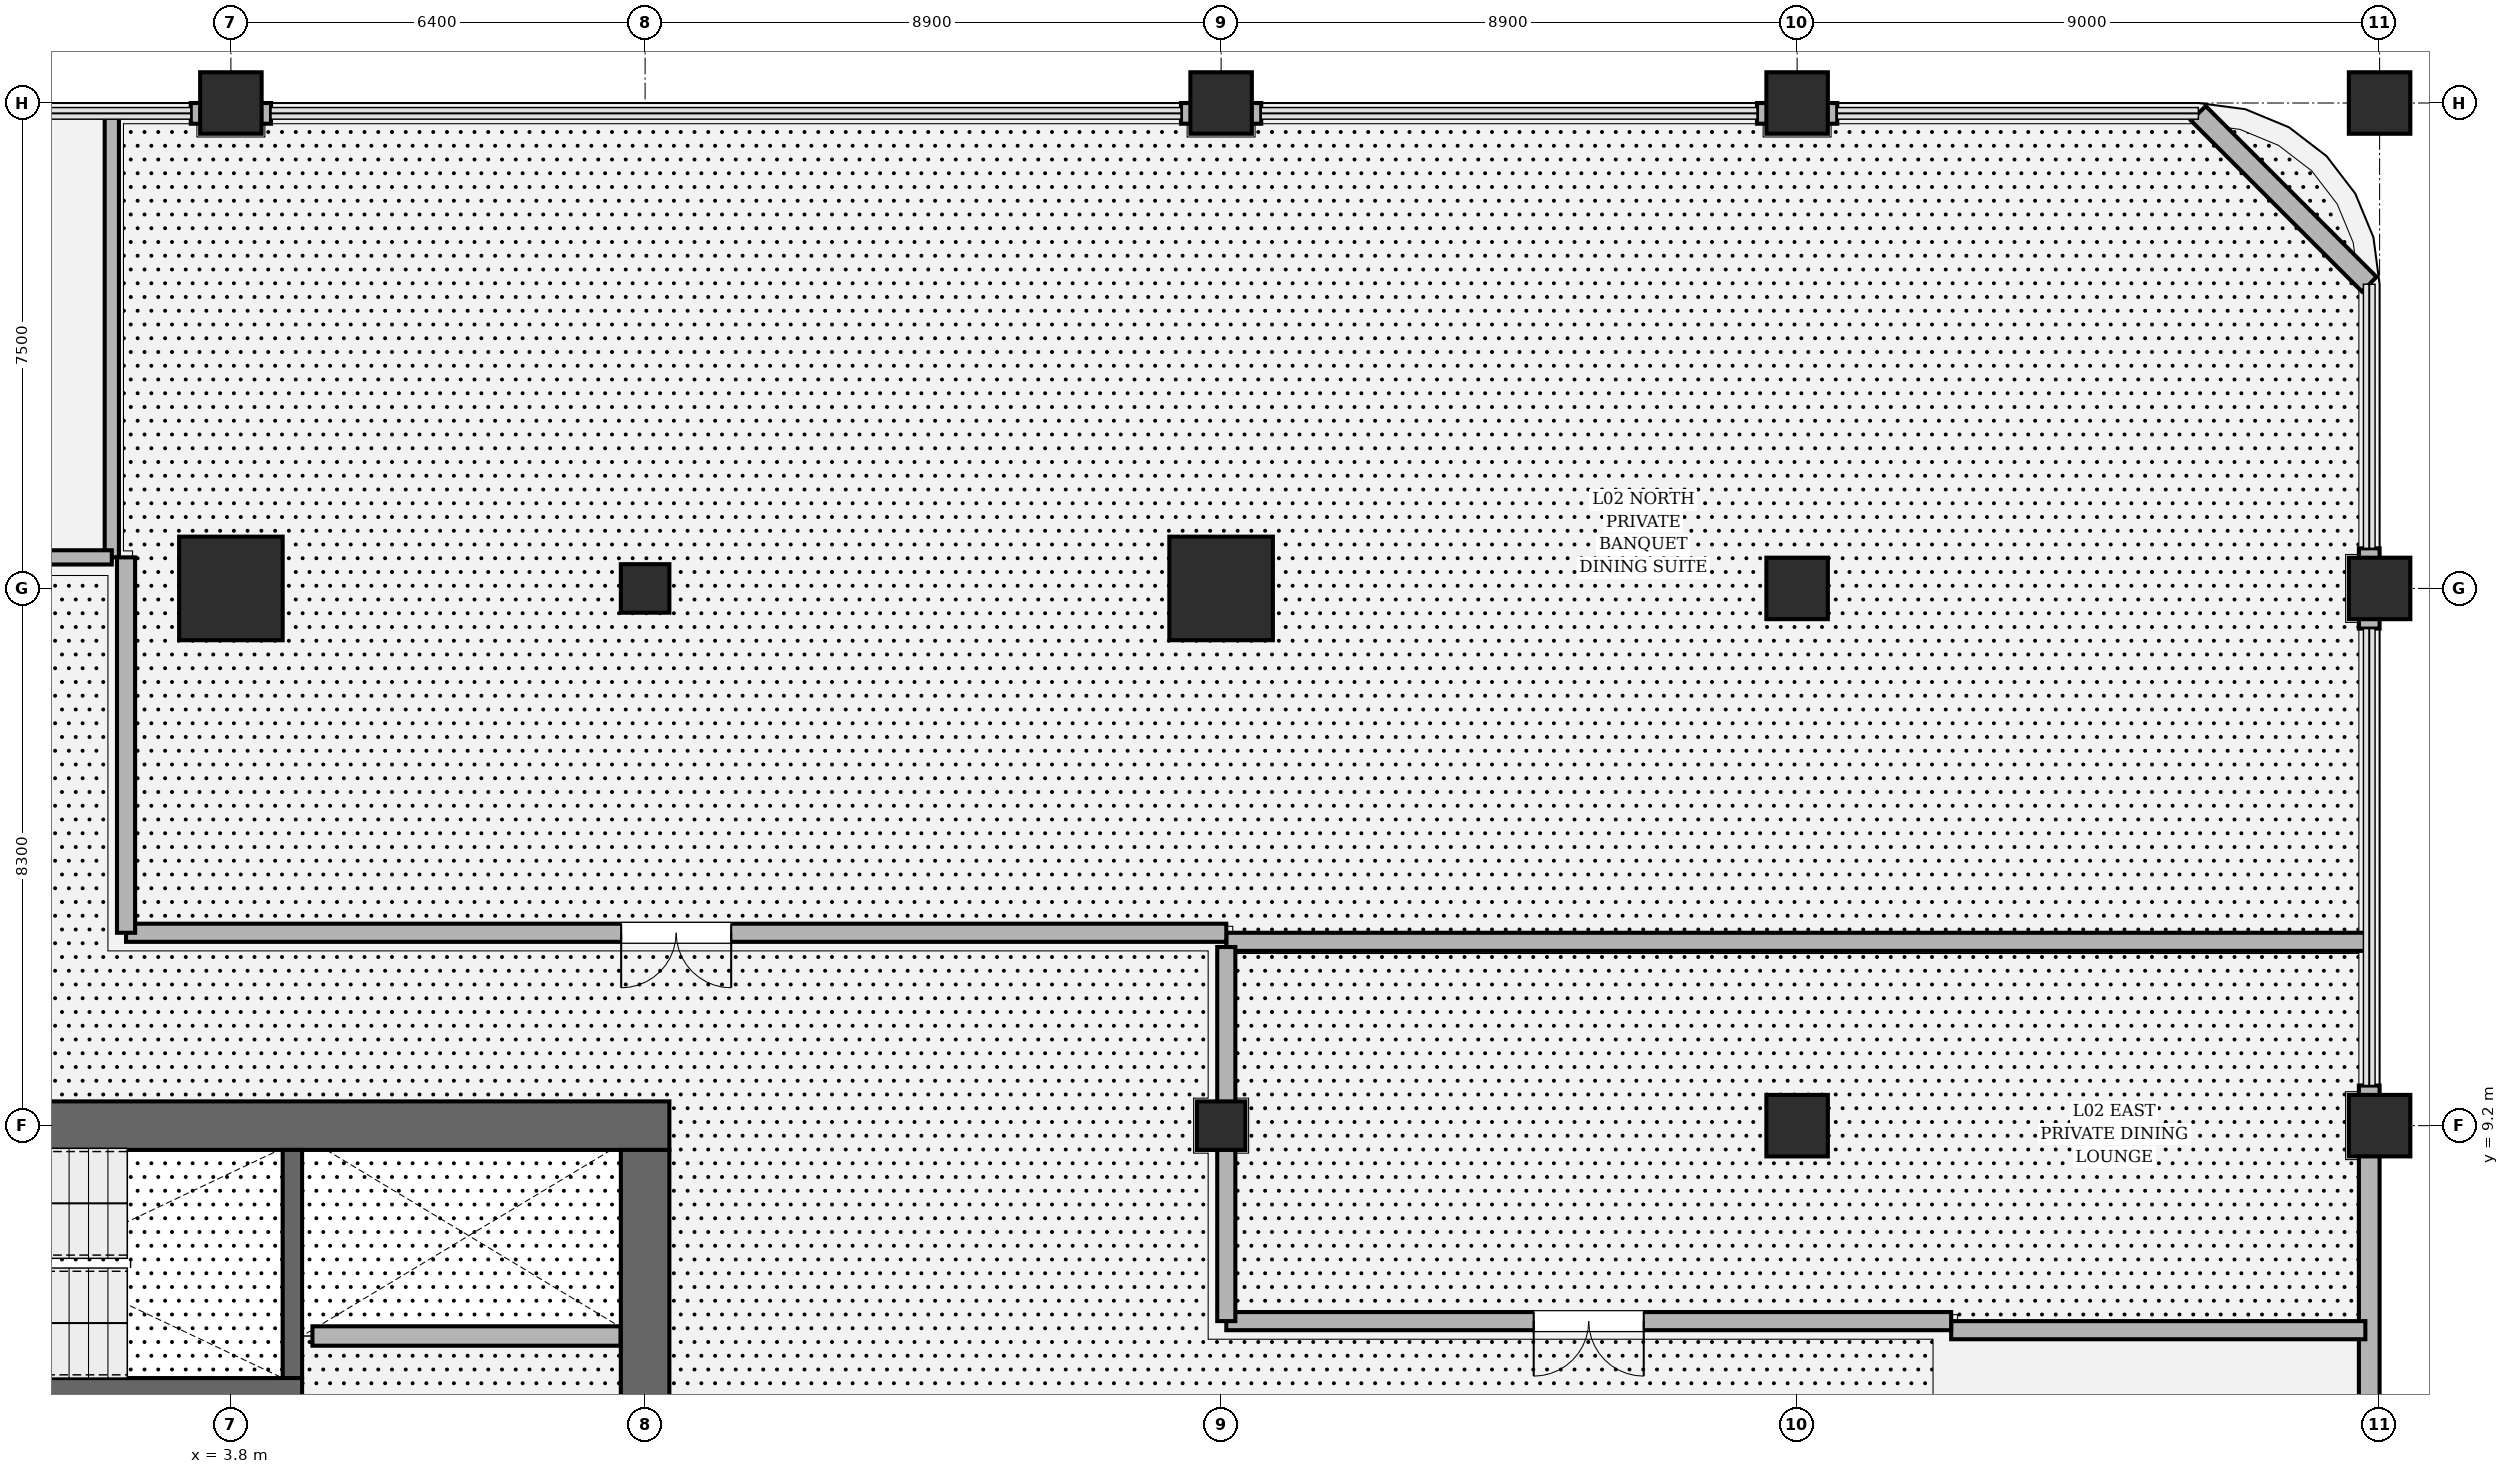
"""IFC4 building model, lengths in metres.
Left out: names, types, materials, properties, quantities, classifications, styles, units other than length and angle.
Written with IfcOpenShell. Run it as: python <this file> out.ifc"""

import sys

from ifc_helpers import new_model, si_unit, direction, frame, frame_2d, origin, origin_2d, place, context, subcontext, project, spatial, rectangle, hollow_rectangle, circle, extrude, element, fill, save


model = new_model("IFC4")
c1 = context("Model", 3, precision=1e-05, world=origin(), true_north=direction((0.0, 1.0)))
c2 = subcontext(c1, "Body", "Model", "MODEL_VIEW")
j1 = project(units=[si_unit("LENGTHUNIT", "METRE"), si_unit("PLANEANGLEUNIT", "RADIAN")], contexts=[c1])
p1 = place(None, origin())
s1 = spatial("IfcSite", under=j1, at=p1, CompositionType="ELEMENT")
p2 = place(p1, origin())
s2 = spatial("IfcBuilding", under=s1, at=p2, CompositionType="ELEMENT")
p3 = place(p2, frame((0.0, 0.0, 11.4)))
s3 = spatial("IfcBuildingStorey", under=s2, at=p3, CompositionType="ELEMENT", Elevation=11.4)
p4 = place(p3, frame((-10.575, 9.2, 0.0), z_axis=(0.0, 0.0, 1.0), x_axis=(1.0, 0.0, 0.0)))
e1 = element("IfcWall", 1, at=p4, inside=s3, PredefinedType="SHEAR", context=c2, shape_type="SweptSolid", body=[
    extrude(rectangle(XDim=21.15, YDim=0.75, at=frame_2d((10.575, 0.0))), origin(), (0.0, 0.0, 1.0), 5.4),
])
p5 = place(p3, frame((10.2, 8.825, 0.0), z_axis=(0.0, 0.0, 1.0), x_axis=(0.0, -1.0, 0.0)))
e2 = element("IfcWall", 2, at=p5, inside=s3, PredefinedType="SHEAR", context=c2, shape_type="SweptSolid", body=[
    extrude(rectangle(XDim=17.65, YDim=0.75, at=frame_2d((8.825, 0.0))), origin(), (0.0, 0.0, 1.0), 5.4),
])
p6 = place(p5, frame((3.855, 0.0, 0.0)))
e3 = element("IfcOpeningElement", 3, at=p6, cuts=e2, PredefinedType="OPENING", context=c2, shape_type="SweptSolid", body=[
    extrude(rectangle(XDim=1.18, YDim=2.2, at=frame_2d((0.59, 1.1))), frame((0.0, 0.385, 0.0), z_axis=(0.0, -1.0, 0.0), x_axis=(1.0, 0.0, 0.0)), (0.0, 0.0, 1.0), 0.77),
])
p7 = place(p3, frame((4.75, 8.825, 0.0), z_axis=(0.0, 0.0, 1.0), x_axis=(0.0, -1.0, 0.0)))
e4 = element("IfcWall", 4, at=p7, inside=s3, PredefinedType="SOLIDWALL", context=c2, shape_type="SweptSolid", body=[
    extrude(rectangle(XDim=3.525, YDim=0.3, at=frame_2d((1.762, 0.0))), origin(), (0.0, 0.0, 1.0), 5.4),
])
p8 = place(p3, frame((-4.9, 5.15, 0.0), z_axis=(0.0, 0.0, 1.0), x_axis=(1.0, 0.0, 0.0)))
e5 = element("IfcWall", 5, at=p8, inside=s3, PredefinedType="SOLIDWALL", context=c2, shape_type="SweptSolid", body=[
    extrude(rectangle(XDim=9.8, YDim=0.3, at=frame_2d((4.9, 0.0))), origin(), (0.0, 0.0, 1.0), 5.4),
])
p9 = place(p8, frame((0.56, 0.0, 0.0)))
e6 = element("IfcOpeningElement", 6, at=p9, cuts=e5, PredefinedType="OPENING", context=c2, shape_type="SweptSolid", body=[
    extrude(rectangle(XDim=1.18, YDim=2.2, at=frame_2d((0.59, 1.1))), frame((0.0, 0.16, 0.0), z_axis=(0.0, -1.0, 0.0), x_axis=(1.0, 0.0, 0.0)), (0.0, 0.0, 1.0), 0.32),
])
for number, where, z_axis, x_axis in (
    (7, (19.1, 17.5, 0.0), (0.0, 0.0, 1.0), (1.0, 0.0, 0.0)),
    (8, (3.8, 17.5, 0.0), (0.0, 0.0, 1.0), (1.0, 0.0, 0.0)),
):
    element("IfcColumn", number, at=place(p3, frame(where, z_axis=z_axis, x_axis=x_axis)), inside=s3, PredefinedType="COLUMN", context=c2, shape_type="SweptSolid", body=[
        extrude(hollow_rectangle(XDim=1.6, YDim=1.6, WallThickness=0.05, at=origin_2d()), origin(), (0.0, 0.0, 1.0), 5.4),
    ])
for number, where, z_axis, x_axis in (
    (9, (37.0, 9.2, 0.0), (0.0, 0.0, 1.0), (1.0, 0.0, 0.0)),
    (10, (28.0, 17.5, 0.0), (0.0, 0.0, 1.0), (1.0, 0.0, 0.0)),
    (11, (37.0, 17.5, 0.0), (0.0, 0.0, 1.0), (1.0, 0.0, 0.0)),
    (12, (3.8, 25.0, 0.0), (0.0, 0.0, 1.0), (1.0, 0.0, 0.0)),
    (13, (19.1, 25.0, 0.0), (0.0, 0.0, 1.0), (1.0, 0.0, 0.0)),
    (14, (28.0, 25.0, 0.0), (0.0, 0.0, 1.0), (1.0, 0.0, 0.0)),
    (15, (37.0, 25.0, 0.0), (0.0, 0.0, 1.0), (1.0, 0.0, 0.0)),
    (16, (28.0, 9.2, 0.0), (0.0, 0.0, 1.0), (1.0, 0.0, 0.0)),
):
    element("IfcColumn", number, at=place(p3, frame(where, z_axis=z_axis, x_axis=x_axis)), inside=s3, PredefinedType="COLUMN", context=c2, shape_type="SweptSolid", body=[
        extrude(rectangle(XDim=0.95, YDim=0.95, at=origin_2d()), origin(), (0.0, 0.0, 1.0), 5.4),
    ])
for number, where, z_axis, x_axis in (
    (17, (10.2, 17.5, 0.0), (0.0, 0.0, 1.0), (1.0, 0.0, 0.0)),
    (18, (19.1, 9.2, 0.0), (0.0, 0.0, 1.0), (1.0, 0.0, 0.0)),
):
    element("IfcColumn", number, at=place(p3, frame(where, z_axis=z_axis, x_axis=x_axis)), inside=s3, PredefinedType="PILASTER", context=c2, shape_type="SweptSolid", body=[
        extrude(circle(Radius=0.375, at=origin_2d()), origin(), (0.0, 0.0, 1.0), 5.4),
    ])
for number, where, z_axis, x_axis in (
    (19, (4.42, 24.84, 0.0), (0.0, 0.0, 1.0), (-1.0, 0.0, 0.0)),
    (20, (19.72, 24.84, 0.0), (0.0, 0.0, 1.0), (-1.0, 0.0, 0.0)),
):
    element("IfcWall", number, at=place(p3, frame(where, z_axis=z_axis, x_axis=x_axis)), inside=s3, PredefinedType="SOLIDWALL", context=c2, shape_type="SweptSolid", body=[
        extrude(rectangle(XDim=1.24, YDim=0.32, at=frame_2d((0.62, 0.0))), origin(), (0.0, 0.0, 1.0), 4.414),
    ])
p10 = place(p3, frame((28.62, 24.84, 0.0), z_axis=(0.0, 0.0, 1.0), x_axis=(-1.0, 0.0, 0.0)))
e21 = element("IfcWall", 21, at=p10, inside=s3, PredefinedType="SOLIDWALL", context=c2, shape_type="SweptSolid", body=[
    extrude(rectangle(XDim=1.24, YDim=0.32, at=frame_2d((0.62, 0.0))), origin(), (0.0, 0.0, 1.0), 4.414),
])
p11 = place(p3, frame((36.84, 9.82, 0.0), z_axis=(0.0, 0.0, 1.0), x_axis=(0.0, -1.0, 0.0)))
e22 = element("IfcWall", 22, at=p11, inside=s3, PredefinedType="SOLIDWALL", context=c2, shape_type="SweptSolid", body=[
    extrude(rectangle(XDim=19.64, YDim=0.32, at=frame_2d((9.82, 0.0))), origin(), (0.0, 0.0, 1.0), 4.414),
])
p12 = place(p3, frame((36.84, 18.12, 0.0), z_axis=(0.0, 0.0, 1.0), x_axis=(0.0, -1.0, 0.0)))
e23 = element("IfcWall", 23, at=p12, inside=s3, PredefinedType="SOLIDWALL", context=c2, shape_type="SweptSolid", body=[
    extrude(rectangle(XDim=1.24, YDim=0.32, at=frame_2d((0.62, 0.0))), origin(), (0.0, 0.0, 1.0), 4.414),
])
p13 = place(p3, frame((34.2, 24.84, 0.0), z_axis=(0.0, 0.0, 1.0), x_axis=(0.707106781187, -0.707106781187, 0.0)))
e24 = element("IfcWall", 24, at=p13, inside=s3, PredefinedType="SOLIDWALL", context=c2, shape_type="SweptSolid", body=[
    extrude(rectangle(XDim=3.734, YDim=0.32, at=frame_2d((1.867, 0.0))), origin(), (0.0, 0.0, 1.0), 4.564),
])
p14 = place(p3, frame((5.06, 5.95, 0.0), z_axis=(0.0, 0.0, 1.0), x_axis=(1.0, 0.0, 0.0)))
e25 = element("IfcWall", 25, at=p14, inside=s3, PredefinedType="SOLIDWALL", context=c2, shape_type="SweptSolid", body=[
    extrude(rectangle(XDim=4.76, YDim=0.3, at=frame_2d((2.38, 0.0))), origin(), (0.0, 0.0, 1.0), 5.12),
])
p15 = place(p3, frame((1.96, 24.78, 0.0), z_axis=(0.0, 0.0, 1.0), x_axis=(0.0, -1.0, 0.0)))
e26 = element("IfcWall", 26, at=p15, inside=s3, PredefinedType="SOLIDWALL", context=c2, shape_type="SweptSolid", body=[
    extrude(rectangle(XDim=6.8, YDim=0.22, at=frame_2d((3.4, 0.0))), origin(), (0.0, 0.0, 1.0), 5.12),
])
p16 = place(p3, frame((1.96, 17.98, 0.0), z_axis=(0.0, 0.0, 1.0), x_axis=(-1.0, 0.0, 0.0)))
e27 = element("IfcWall", 27, at=p16, inside=s3, PredefinedType="SOLIDWALL", context=c2, shape_type="SweptSolid", body=[
    extrude(rectangle(XDim=8.1, YDim=0.22, at=frame_2d((4.05, 0.0))), origin(), (0.0, 0.0, 1.0), 4.414),
])
p17 = place(p16, frame((3.5, 0.0, 0.0)))
e28 = element("IfcOpeningElement", 28, at=p17, cuts=e27, PredefinedType="OPENING", context=c2, shape_type="SweptSolid", body=[
    extrude(rectangle(XDim=1.1, YDim=2.2, at=frame_2d((0.55, 1.1))), frame((0.0, 0.12, 0.0), z_axis=(0.0, -1.0, 0.0), x_axis=(1.0, 0.0, 0.0)), (0.0, 0.0, 1.0), 0.24),
])
p18 = place(p3, frame((36.78, 12.04, 0.0), z_axis=(0.0, 0.0, 1.0), x_axis=(-1.0, 0.0, 0.0)))
e29 = element("IfcWall", 29, at=p18, inside=s3, PredefinedType="SOLIDWALL", context=c2, shape_type="SweptSolid", body=[
    extrude(rectangle(XDim=17.6, YDim=0.28, at=frame_2d((8.8, 0.0))), origin(), (0.0, 0.0, 1.0), 4.414),
])
p19 = place(p3, frame((19.18, 12.18, 0.0), z_axis=(0.0, 0.0, 1.0), x_axis=(-1.0, 0.0, 0.0)))
e30 = element("IfcWall", 30, at=p19, inside=s3, PredefinedType="SOLIDWALL", context=c2, shape_type="SweptSolid", body=[
    extrude(rectangle(XDim=17.0, YDim=0.28, at=frame_2d((8.5, 0.0))), origin(), (0.0, 0.0, 1.0), 4.414),
])
p20 = place(p19, frame((7.65, 0.0, 0.0)))
e31 = element("IfcOpeningElement", 31, at=p20, cuts=e30, PredefinedType="OPENING", context=c2, shape_type="SweptSolid", body=[
    extrude(rectangle(XDim=1.7, YDim=2.3, at=frame_2d((0.85, 1.15))), frame((0.0, 0.15, 0.0), z_axis=(0.0, -1.0, 0.0), x_axis=(1.0, 0.0, 0.0)), (0.0, 0.0, 1.0), 0.3),
])
p21 = place(p3, frame((2.18, 12.18, 0.0), z_axis=(0.0, 0.0, 1.0), x_axis=(0.0, 1.0, 0.0)))
e32 = element("IfcWall", 32, at=p21, inside=s3, PredefinedType="SOLIDWALL", context=c2, shape_type="SweptSolid", body=[
    extrude(rectangle(XDim=5.8, YDim=0.28, at=frame_2d((2.9, 0.0))), origin(), (0.0, 0.0, 1.0), 4.414),
])
p22 = place(p3, frame((36.78, 6.04, 0.0), z_axis=(0.0, 0.0, 1.0), x_axis=(-1.0, 0.0, 0.0)))
e33 = element("IfcWall", 33, at=p22, inside=s3, PredefinedType="SOLIDWALL", context=c2, shape_type="SweptSolid", body=[
    extrude(rectangle(XDim=6.4, YDim=0.28, at=frame_2d((3.2, 0.0))), origin(), (0.0, 0.0, 1.0), 5.12),
])
p23 = place(p3, frame((30.38, 6.18, 0.0), z_axis=(0.0, 0.0, 1.0), x_axis=(-1.0, 0.0, 0.0)))
e34 = element("IfcWall", 34, at=p23, inside=s3, PredefinedType="SOLIDWALL", context=c2, shape_type="SweptSolid", body=[
    extrude(rectangle(XDim=11.2, YDim=0.28, at=frame_2d((5.6, 0.0))), origin(), (0.0, 0.0, 1.0), 4.414),
])
p24 = place(p23, frame((4.75, 0.0, 0.0)))
e35 = element("IfcOpeningElement", 35, at=p24, cuts=e34, PredefinedType="OPENING", context=c2, shape_type="SweptSolid", body=[
    extrude(rectangle(XDim=1.7, YDim=2.3, at=frame_2d((0.85, 1.15))), frame((0.0, 0.15, 0.0), z_axis=(0.0, -1.0, 0.0), x_axis=(1.0, 0.0, 0.0)), (0.0, 0.0, 1.0), 0.3),
])
p25 = place(p3, frame((19.18, 6.18, 0.0), z_axis=(0.0, 0.0, 1.0), x_axis=(0.0, 1.0, 0.0)))
e36 = element("IfcWall", 36, at=p25, inside=s3, PredefinedType="SOLIDWALL", context=c2, shape_type="SweptSolid", body=[
    extrude(rectangle(XDim=5.78, YDim=0.28, at=frame_2d((2.89, 0.0))), origin(), (0.0, 0.0, 1.0), 4.414),
])
p26 = place(p20, origin())
e37 = element("IfcDoor", 37, at=p26, inside=s3, OperationType="DOUBLE_DOOR_SINGLE_SWING", PredefinedType="DOOR", context=c2, shape_type="SweptSolid", body=[
    extrude(rectangle(XDim=1.7, YDim=2.3, at=frame_2d((0.85, 1.15))), frame((0.0, 0.025, 0.0), z_axis=(0.0, -1.0, 0.0), x_axis=(1.0, 0.0, 0.0)), (0.0, 0.0, 1.0), 0.05),
])
fill(e31, e37)
p27 = place(p24, origin())
e38 = element("IfcDoor", 38, at=p27, inside=s3, OperationType="DOUBLE_DOOR_SINGLE_SWING", PredefinedType="DOOR", context=c2, shape_type="SweptSolid", body=[
    extrude(rectangle(XDim=1.7, YDim=2.3, at=frame_2d((0.85, 1.15))), frame((0.0, 0.025, 0.0), z_axis=(0.0, -1.0, 0.0), x_axis=(1.0, 0.0, 0.0)), (0.0, 0.0, 1.0), 0.05),
])
fill(e35, e38)
save(model, sys.argv[1])
